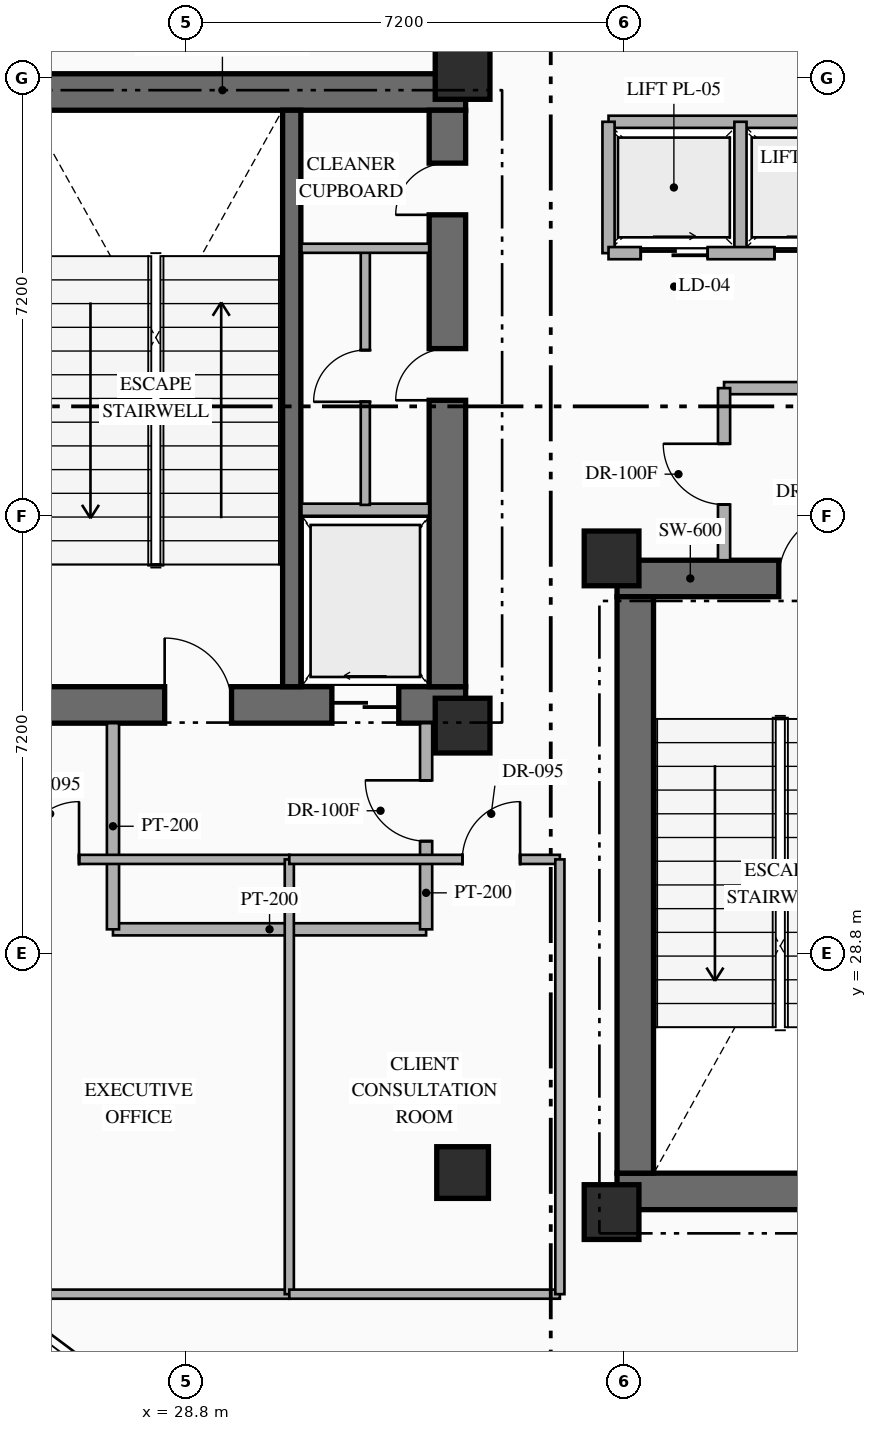
"""IFC4 building model, lengths in metres.
Left out: names, types, materials, properties, quantities, classifications, styles, units other than length and angle.
Written with IfcOpenShell. Run it as: python <this file> out.ifc"""

import sys

from ifc_helpers import new_model, si_unit, direction, frame, frame_2d, origin, origin_2d, place, context, subcontext, project, spatial, rectangle, hollow_rectangle, extrude, element, fill, save


model = new_model("IFC4")
c1 = context("Model", 3, precision=1e-05, world=origin(), true_north=direction((0.0, 1.0)))
c2 = subcontext(c1, "Body", "Model", "MODEL_VIEW")
j1 = project(units=[si_unit("LENGTHUNIT", "METRE"), si_unit("PLANEANGLEUNIT", "RADIAN")], contexts=[c1])
p1 = place(None, origin())
s1 = spatial("IfcSite", under=j1, at=p1, CompositionType="ELEMENT")
p2 = place(p1, origin())
s2 = spatial("IfcBuilding", under=s1, at=p2, CompositionType="ELEMENT")
p3 = place(p2, frame((0.0, 0.0, 130.05)))
s3 = spatial("IfcBuildingStorey", under=s2, at=p3, CompositionType="ELEMENT", Elevation=130.05)
p4 = place(p3, frame((25.62, 32.89, 0.0), z_axis=(0.0, 0.0, 1.0), x_axis=(1.0, 0.0, 0.0)))
e1 = element("IfcWall", 1, at=p4, inside=s3, PredefinedType="SHEAR", context=c2, shape_type="SweptSolid", body=[
    extrude(rectangle(XDim=7.78, YDim=0.6, at=frame_2d((3.89, 0.0))), origin(), (0.0, 0.0, 1.0), 4.8),
])
p5 = place(p4, frame((2.83, 0.0, 0.0)))
e2 = element("IfcOpeningElement", 2, at=p5, cuts=e1, PredefinedType="OPENING", context=c2, shape_type="SweptSolid", body=[
    extrude(rectangle(XDim=1.1, YDim=2.2, at=frame_2d((0.55, 1.1))), frame((0.0, 0.31, 0.0), z_axis=(0.0, -1.0, 0.0), x_axis=(1.0, 0.0, 0.0)), (0.0, 0.0, 1.0), 0.62),
])
p6 = place(p4, frame((5.58, 0.0, 0.0)))
e3 = element("IfcOpeningElement", 3, at=p6, cuts=e1, PredefinedType="OPENING", context=c2, shape_type="SweptSolid", body=[
    extrude(rectangle(XDim=1.1, YDim=2.15, at=frame_2d((0.55, 1.075))), frame((0.0, 0.31, 0.0), z_axis=(0.0, -1.0, 0.0), x_axis=(1.0, 0.0, 0.0)), (0.0, 0.0, 1.0), 0.62),
])
p7 = place(p3, frame((25.62, 42.97, 0.0), z_axis=(0.0, 0.0, 1.0), x_axis=(1.0, 0.0, 0.0)))
e4 = element("IfcWall", 4, at=p7, inside=s3, PredefinedType="SHEAR", context=c2, shape_type="SweptSolid", body=[
    extrude(rectangle(XDim=7.78, YDim=0.6, at=frame_2d((3.89, 0.0))), origin(), (0.0, 0.0, 1.0), 4.8),
])
p8 = place(p3, frame((33.1, 33.19, 0.0), z_axis=(0.0, 0.0, 1.0), x_axis=(0.0, 1.0, 0.0)))
e5 = element("IfcWall", 5, at=p8, inside=s3, PredefinedType="SHEAR", context=c2, shape_type="SweptSolid", body=[
    extrude(rectangle(XDim=9.48, YDim=0.6, at=frame_2d((4.74, 0.0))), origin(), (0.0, 0.0, 1.0), 4.8),
])
p9 = place(p8, frame((4.71, 0.0, 0.0)))
e6 = element("IfcOpeningElement", 6, at=p9, cuts=e5, PredefinedType="OPENING", context=c2, shape_type="SweptSolid", body=[
    extrude(rectangle(XDim=0.85, YDim=2.08, at=frame_2d((0.425, 1.04))), frame((0.0, 0.31, 0.0), z_axis=(0.0, -1.0, 0.0), x_axis=(1.0, 0.0, 0.0)), (0.0, 0.0, 1.0), 0.62),
])
p10 = place(p8, frame((7.76, 0.0, 0.0)))
e7 = element("IfcOpeningElement", 7, at=p10, cuts=e5, PredefinedType="OPENING", context=c2, shape_type="SweptSolid", body=[
    extrude(rectangle(XDim=0.85, YDim=2.08, at=frame_2d((0.425, 1.04))), frame((0.0, 0.31, 0.0), z_axis=(0.0, -1.0, 0.0), x_axis=(1.0, 0.0, 0.0)), (0.0, 0.0, 1.0), 0.62),
])
p11 = place(p3, frame((30.54, 33.19, 0.0), z_axis=(0.0, 0.0, 1.0), x_axis=(0.0, 1.0, 0.0)))
e8 = element("IfcWall", 8, at=p11, inside=s3, PredefinedType="SHEAR", context=c2, shape_type="SweptSolid", body=[
    extrude(rectangle(XDim=9.48, YDim=0.3, at=frame_2d((4.74, 0.0))), origin(), (0.0, 0.0, 1.0), 4.8),
])
p12 = place(p3, frame((35.89, 24.89, 0.0), z_axis=(0.0, 0.0, 1.0), x_axis=(1.0, 0.0, 0.0)))
e9 = element("IfcWall", 9, at=p12, inside=s3, PredefinedType="SHEAR", context=c2, shape_type="SweptSolid", body=[
    extrude(rectangle(XDim=7.76, YDim=0.6, at=frame_2d((3.88, 0.0))), origin(), (0.0, 0.0, 1.0), 4.8),
])
p13 = place(p3, frame((35.89, 34.97, 0.0), z_axis=(0.0, 0.0, 1.0), x_axis=(1.0, 0.0, 0.0)))
e10 = element("IfcWall", 10, at=p13, inside=s3, PredefinedType="SHEAR", context=c2, shape_type="SweptSolid", body=[
    extrude(rectangle(XDim=7.76, YDim=0.6, at=frame_2d((3.88, 0.0))), origin(), (0.0, 0.0, 1.0), 4.8),
])
p14 = place(p13, frame((2.66, 0.0, 0.0)))
e11 = element("IfcOpeningElement", 11, at=p14, cuts=e10, PredefinedType="OPENING", context=c2, shape_type="SweptSolid", body=[
    extrude(rectangle(XDim=1.1, YDim=2.2, at=frame_2d((0.55, 1.1))), frame((0.0, 0.31, 0.0), z_axis=(0.0, -1.0, 0.0), x_axis=(1.0, 0.0, 0.0)), (0.0, 0.0, 1.0), 0.62),
])
p15 = place(p13, frame((5.56, 0.0, 0.0)))
e12 = element("IfcOpeningElement", 12, at=p15, cuts=e10, PredefinedType="OPENING", context=c2, shape_type="SweptSolid", body=[
    extrude(rectangle(XDim=1.12, YDim=2.15, at=frame_2d((0.56, 1.075))), frame((0.0, 0.31, 0.0), z_axis=(0.0, -1.0, 0.0), x_axis=(1.0, 0.0, 0.0)), (0.0, 0.0, 1.0), 0.62),
])
p16 = place(p3, frame((36.19, 25.19, 0.0), z_axis=(0.0, 0.0, 1.0), x_axis=(0.0, 1.0, 0.0)))
e13 = element("IfcWall", 13, at=p16, inside=s3, PredefinedType="SHEAR", context=c2, shape_type="SweptSolid", body=[
    extrude(rectangle(XDim=9.48, YDim=0.6, at=frame_2d((4.74, 0.0))), origin(), (0.0, 0.0, 1.0), 4.8),
])
for number, where, z_axis, x_axis in (
    (14, (33.35, 32.55, 0.0), (0.0, 0.0, 1.0), (1.0, 0.0, 0.0)),
    (15, (33.35, 43.3, 0.0), (0.0, 0.0, 1.0), (1.0, 0.0, 0.0)),
    (16, (35.8, 24.55, 0.0), (0.0, 0.0, 1.0), (1.0, 0.0, 0.0)),
    (17, (35.8, 35.3, 0.0), (0.0, 0.0, 1.0), (1.0, 0.0, 0.0)),
):
    element("IfcColumn", number, at=place(p3, frame(where, z_axis=z_axis, x_axis=x_axis)), inside=s3, PredefinedType="COLUMN", context=c2, shape_type="SweptSolid", body=[
        extrude(rectangle(XDim=0.9, YDim=0.9, at=origin_2d()), origin(), (0.0, 0.0, 1.0), 4.8),
    ])
p17 = place(p3, frame((33.35, 25.2, 0.0), z_axis=(0.0, 0.0, 1.0), x_axis=(1.0, 0.0, 0.0)))
e18 = element("IfcColumn", 18, at=p17, inside=s3, PredefinedType="COLUMN", context=c2, shape_type="SweptSolid", body=[
    extrude(hollow_rectangle(XDim=0.85, YDim=0.85, WallThickness=0.032, at=origin_2d()), origin(), (0.0, 0.0, 1.0), 4.8),
])
p18 = place(p3, frame((30.7, 36.1, 0.0), z_axis=(0.0, 0.0, 1.0), x_axis=(1.0, 0.0, 0.0)))
e19 = element("IfcWall", 19, at=p18, inside=s3, PredefinedType="STANDARD", context=c2, shape_type="SweptSolid", body=[
    extrude(rectangle(XDim=2.1, YDim=0.2, at=frame_2d((1.05, 0.0))), origin(), (0.0, 0.0, 1.0), 4.55),
])
p19 = place(p3, frame((31.75, 36.18, 0.0), z_axis=(0.0, 0.0, 1.0), x_axis=(0.0, 1.0, 0.0)))
e20 = element("IfcWall", 20, at=p19, inside=s3, PredefinedType="PARTITIONING", context=c2, shape_type="SweptSolid", body=[
    extrude(rectangle(XDim=4.24, YDim=0.15, at=frame_2d((2.12, 0.0))), origin(), (0.0, 0.0, 1.0), 4.55),
])
p20 = place(p19, frame((1.695, 0.0, 0.0)))
e21 = element("IfcOpeningElement", 21, at=p20, cuts=e20, PredefinedType="OPENING", context=c2, shape_type="SweptSolid", body=[
    extrude(rectangle(XDim=0.85, YDim=2.08, at=frame_2d((0.425, 1.04))), frame((0.0, 0.085, 0.0), z_axis=(0.0, -1.0, 0.0), x_axis=(1.0, 0.0, 0.0)), (0.0, 0.0, 1.0), 0.17),
])
p21 = place(p3, frame((30.7, 40.4, 0.0), z_axis=(0.0, 0.0, 1.0), x_axis=(1.0, 0.0, 0.0)))
e22 = element("IfcWall", 22, at=p21, inside=s3, PredefinedType="PARTITIONING", context=c2, shape_type="SweptSolid", body=[
    extrude(rectangle(XDim=2.1, YDim=0.15, at=frame_2d((1.05, 0.0))), origin(), (0.0, 0.0, 1.0), 4.55),
])
p22 = place(p3, frame((27.6, 29.2, 0.0), z_axis=(0.0, 0.0, 1.0), x_axis=(1.0, 0.0, 0.0)))
e23 = element("IfcWall", 23, at=p22, inside=s3, PredefinedType="STANDARD", context=c2, shape_type="SweptSolid", body=[
    extrude(rectangle(XDim=5.15, YDim=0.2, at=frame_2d((2.575, 0.0))), origin(), (0.0, 0.0, 1.0), 4.55),
])
p23 = place(p3, frame((27.6, 29.2, 0.0), z_axis=(0.0, 0.0, 1.0), x_axis=(0.0, 1.0, 0.0)))
e24 = element("IfcWall", 24, at=p23, inside=s3, PredefinedType="STANDARD", context=c2, shape_type="SweptSolid", body=[
    extrude(rectangle(XDim=3.39, YDim=0.2, at=frame_2d((1.695, 0.0))), origin(), (0.0, 0.0, 1.0), 4.55),
])
p24 = place(p3, frame((32.75, 29.2, 0.0), z_axis=(0.0, 0.0, 1.0), x_axis=(0.0, 1.0, 0.0)))
e25 = element("IfcWall", 25, at=p24, inside=s3, PredefinedType="STANDARD", context=c2, shape_type="SweptSolid", body=[
    extrude(rectangle(XDim=3.39, YDim=0.2, at=frame_2d((1.695, 0.0))), origin(), (0.0, 0.0, 1.0), 4.55),
])
p25 = place(p24, frame((1.45, 0.0, 0.0)))
e26 = element("IfcOpeningElement", 26, at=p25, cuts=e25, PredefinedType="OPENING", context=c2, shape_type="SweptSolid", body=[
    extrude(rectangle(XDim=1.0, YDim=2.2, at=frame_2d((0.5, 1.1))), frame((0.0, 0.11, 0.0), z_axis=(0.0, -1.0, 0.0), x_axis=(1.0, 0.0, 0.0)), (0.0, 0.0, 1.0), 0.22),
])
p26 = place(p3, frame((37.65, 38.1, 0.0), z_axis=(0.0, 0.0, 1.0), x_axis=(1.0, 0.0, 0.0)))
e27 = element("IfcWall", 27, at=p26, inside=s3, PredefinedType="STANDARD", context=c2, shape_type="SweptSolid", body=[
    extrude(rectangle(XDim=5.3, YDim=0.2, at=frame_2d((2.65, 0.0))), origin(), (0.0, 0.0, 1.0), 4.55),
])
p27 = place(p3, frame((37.65, 35.27, 0.0), z_axis=(0.0, 0.0, 1.0), x_axis=(0.0, 1.0, 0.0)))
e28 = element("IfcWall", 28, at=p27, inside=s3, PredefinedType="STANDARD", context=c2, shape_type="SweptSolid", body=[
    extrude(rectangle(XDim=2.83, YDim=0.2, at=frame_2d((1.415, 0.0))), origin(), (0.0, 0.0, 1.0), 4.55),
])
p28 = place(p27, frame((0.915, 0.0, 0.0)))
e29 = element("IfcOpeningElement", 29, at=p28, cuts=e28, PredefinedType="OPENING", context=c2, shape_type="SweptSolid", body=[
    extrude(rectangle(XDim=1.0, YDim=2.2, at=frame_2d((0.5, 1.1))), frame((0.0, 0.11, 0.0), z_axis=(0.0, -1.0, 0.0), x_axis=(1.0, 0.0, 0.0)), (0.0, 0.0, 1.0), 0.22),
])
p29 = place(p3, frame((35.75, 42.48, 0.0), z_axis=(0.0, 0.0, 1.0), x_axis=(1.0, 0.0, 0.0)))
e30 = element("IfcWall", 30, at=p29, inside=s3, PredefinedType="STANDARD", context=c2, shape_type="SweptSolid", body=[
    extrude(rectangle(XDim=9.11, YDim=0.2, at=frame_2d((4.555, 0.0))), origin(), (0.0, 0.0, 1.0), 4.55),
])
for number, where, z_axis, x_axis in (
    (31, (35.75, 40.32, 0.0), (0.0, 0.0, 1.0), (0.0, 1.0, 0.0)),
    (32, (37.92, 40.32, 0.0), (0.0, 0.0, 1.0), (0.0, 1.0, 0.0)),
):
    element("IfcWall", number, at=place(p3, frame(where, z_axis=z_axis, x_axis=x_axis)), inside=s3, PredefinedType="STANDARD", context=c2, shape_type="SweptSolid", body=[
        extrude(rectangle(XDim=2.16, YDim=0.2, at=frame_2d((1.08, 0.0))), origin(), (0.0, 0.0, 1.0), 4.55),
    ])
p30 = place(p3, frame((35.75, 40.32, 0.0), z_axis=(0.0, 0.0, 1.0), x_axis=(1.0, 0.0, 0.0)))
e33 = element("IfcWall", 33, at=p30, inside=s3, PredefinedType="STANDARD", context=c2, shape_type="SweptSolid", body=[
    extrude(rectangle(XDim=9.11, YDim=0.2, at=frame_2d((4.555, 0.0))), origin(), (0.0, 0.0, 1.0), 4.55),
])
p31 = place(p30, frame((0.53, 0.0, 0.0)))
e34 = element("IfcOpeningElement", 34, at=p31, cuts=e33, PredefinedType="OPENING", context=c2, shape_type="SweptSolid", body=[
    extrude(rectangle(XDim=1.1, YDim=2.18, at=frame_2d((0.55, 1.09))), frame((0.0, 0.11, 0.0), z_axis=(0.0, -1.0, 0.0), x_axis=(1.0, 0.0, 0.0)), (0.0, 0.0, 1.0), 0.22),
])
p32 = place(p30, frame((2.73, 0.0, 0.0)))
e35 = element("IfcOpeningElement", 35, at=p32, cuts=e33, PredefinedType="OPENING", context=c2, shape_type="SweptSolid", body=[
    extrude(rectangle(XDim=1.1, YDim=2.18, at=frame_2d((0.55, 1.09))), frame((0.0, 0.11, 0.0), z_axis=(0.0, -1.0, 0.0), x_axis=(1.0, 0.0, 0.0)), (0.0, 0.0, 1.0), 0.22),
])
p33 = place(p30, frame((4.93, 0.0, 0.0)))
e36 = element("IfcOpeningElement", 36, at=p33, cuts=e33, PredefinedType="OPENING", context=c2, shape_type="SweptSolid", body=[
    extrude(rectangle(XDim=1.1, YDim=2.18, at=frame_2d((0.55, 1.09))), frame((0.0, 0.11, 0.0), z_axis=(0.0, -1.0, 0.0), x_axis=(1.0, 0.0, 0.0)), (0.0, 0.0, 1.0), 0.22),
])
p34 = place(p30, frame((7.13, 0.0, 0.0)))
e37 = element("IfcOpeningElement", 37, at=p34, cuts=e33, PredefinedType="OPENING", context=c2, shape_type="SweptSolid", body=[
    extrude(rectangle(XDim=1.1, YDim=2.18, at=frame_2d((0.55, 1.09))), frame((0.0, 0.11, 0.0), z_axis=(0.0, -1.0, 0.0), x_axis=(1.0, 0.0, 0.0)), (0.0, 0.0, 1.0), 0.22),
])
p35 = place(p3, frame((25.55, 23.2, 0.0), z_axis=(0.0, 0.0, 1.0), x_axis=(1.0, 0.0, 0.0)))
e38 = element("IfcWall", 38, at=p35, inside=s3, PredefinedType="PARTITIONING", context=c2, shape_type="SweptSolid", body=[
    extrude(rectangle(XDim=4.95, YDim=0.15, at=frame_2d((2.475, 0.0))), origin(), (0.0, 0.0, 1.0), 4.55),
])
p36 = place(p3, frame((25.55, 30.35, 0.0), z_axis=(0.0, 0.0, 1.0), x_axis=(1.0, 0.0, 0.0)))
e39 = element("IfcWall", 39, at=p36, inside=s3, PredefinedType="PARTITIONING", context=c2, shape_type="SweptSolid", body=[
    extrude(rectangle(XDim=4.95, YDim=0.15, at=frame_2d((2.475, 0.0))), origin(), (0.0, 0.0, 1.0), 4.55),
])
p37 = place(p36, frame((0.542, 0.0, 0.0)))
e40 = element("IfcOpeningElement", 40, at=p37, cuts=e39, PredefinedType="OPENING", context=c2, shape_type="SweptSolid", body=[
    extrude(rectangle(XDim=0.95, YDim=2.15, at=frame_2d((0.475, 1.075))), frame((0.0, 0.085, 0.0), z_axis=(0.0, -1.0, 0.0), x_axis=(1.0, 0.0, 0.0)), (0.0, 0.0, 1.0), 0.17),
])
p38 = place(p3, frame((30.5, 23.2, 0.0), z_axis=(0.0, 0.0, 1.0), x_axis=(0.0, 1.0, 0.0)))
e41 = element("IfcWall", 41, at=p38, inside=s3, PredefinedType="PARTITIONING", context=c2, shape_type="SweptSolid", body=[
    extrude(rectangle(XDim=7.15, YDim=0.15, at=frame_2d((3.575, 0.0))), origin(), (0.0, 0.0, 1.0), 4.55),
])
p39 = place(p3, frame((30.5, 23.2, 0.0), z_axis=(0.0, 0.0, 1.0), x_axis=(1.0, 0.0, 0.0)))
e42 = element("IfcWall", 42, at=p39, inside=s3, PredefinedType="PARTITIONING", context=c2, shape_type="SweptSolid", body=[
    extrude(rectangle(XDim=4.45, YDim=0.15, at=frame_2d((2.225, 0.0))), origin(), (0.0, 0.0, 1.0), 4.55),
])
p40 = place(p3, frame((30.5, 30.35, 0.0), z_axis=(0.0, 0.0, 1.0), x_axis=(1.0, 0.0, 0.0)))
e43 = element("IfcWall", 43, at=p40, inside=s3, PredefinedType="PARTITIONING", context=c2, shape_type="SweptSolid", body=[
    extrude(rectangle(XDim=4.45, YDim=0.15, at=frame_2d((2.225, 0.0))), origin(), (0.0, 0.0, 1.0), 4.55),
])
p41 = place(p40, frame((2.846, 0.0, 0.0)))
e44 = element("IfcOpeningElement", 44, at=p41, cuts=e43, PredefinedType="OPENING", context=c2, shape_type="SweptSolid", body=[
    extrude(rectangle(XDim=0.95, YDim=2.15, at=frame_2d((0.475, 1.075))), frame((0.0, 0.085, 0.0), z_axis=(0.0, -1.0, 0.0), x_axis=(1.0, 0.0, 0.0)), (0.0, 0.0, 1.0), 0.17),
])
p42 = place(p3, frame((34.95, 23.2, 0.0), z_axis=(0.0, 0.0, 1.0), x_axis=(0.0, 1.0, 0.0)))
e45 = element("IfcWall", 45, at=p42, inside=s3, PredefinedType="PARTITIONING", context=c2, shape_type="SweptSolid", body=[
    extrude(rectangle(XDim=7.15, YDim=0.15, at=frame_2d((3.575, 0.0))), origin(), (0.0, 0.0, 1.0), 4.55),
])
p43 = place(p3, frame((38.504, 13.472, 0.0), z_axis=(0.0, 0.0, 1.0), x_axis=(0.599993679268, 0.80000474051, 0.0)))
e46 = element("IfcWall", 46, at=p43, inside=s3, PredefinedType="PARTITIONING", context=c2, shape_type="SweptSolid", body=[
    extrude(rectangle(XDim=12.36, YDim=0.15, at=frame_2d((6.18, 0.0))), origin(), (0.0, 0.0, 1.0), 4.55),
])
p44 = place(p43, frame((5.705, 0.0, 0.0)))
e47 = element("IfcOpeningElement", 47, at=p44, cuts=e46, PredefinedType="OPENING", context=c2, shape_type="SweptSolid", body=[
    extrude(rectangle(XDim=0.95, YDim=2.15, at=frame_2d((0.475, 1.075))), frame((0.0, 0.085, 0.0), z_axis=(0.0, -1.0, 0.0), x_axis=(1.0, 0.0, 0.0)), (0.0, 0.0, 1.0), 0.17),
])
p45 = place(p5, origin())
e48 = element("IfcDoor", 48, at=p45, inside=s3, OperationType="SINGLE_SWING_LEFT", PredefinedType="DOOR", context=c2, shape_type="SweptSolid", body=[
    extrude(rectangle(XDim=1.1, YDim=2.2, at=frame_2d((0.55, 1.1))), frame((0.0, 0.025, 0.0), z_axis=(0.0, -1.0, 0.0), x_axis=(1.0, 0.0, 0.0)), (0.0, 0.0, 1.0), 0.05),
])
fill(e2, e48)
p46 = place(p6, origin())
e49 = element("IfcDoor", 49, at=p46, inside=s3, OperationType="SLIDING_TO_LEFT", PredefinedType="USERDEFINED", context=c2, shape_type="SweptSolid", body=[
    extrude(rectangle(XDim=1.1, YDim=2.15, at=frame_2d((0.55, 1.075))), frame((0.0, 0.025, 0.0), z_axis=(0.0, -1.0, 0.0), x_axis=(1.0, 0.0, 0.0)), (0.0, 0.0, 1.0), 0.05),
])
fill(e3, e49)
p47 = place(p14, origin())
e50 = element("IfcDoor", 50, at=p47, inside=s3, OperationType="SINGLE_SWING_RIGHT", PredefinedType="DOOR", context=c2, shape_type="SweptSolid", body=[
    extrude(rectangle(XDim=1.1, YDim=2.2, at=frame_2d((0.55, 1.1))), frame((0.0, 0.025, 0.0), z_axis=(0.0, -1.0, 0.0), x_axis=(1.0, 0.0, 0.0)), (0.0, 0.0, 1.0), 0.05),
])
fill(e11, e50)
p48 = place(p9, origin())
e51 = element("IfcDoor", 51, at=p48, inside=s3, OperationType="SINGLE_SWING_LEFT", PredefinedType="DOOR", context=c2, shape_type="SweptSolid", body=[
    extrude(rectangle(XDim=0.85, YDim=2.08, at=frame_2d((0.425, 1.04))), frame((0.0, 0.025, 0.0), z_axis=(0.0, -1.0, 0.0), x_axis=(1.0, 0.0, 0.0)), (0.0, 0.0, 1.0), 0.05),
])
fill(e6, e51)
p49 = place(p10, origin())
e52 = element("IfcDoor", 52, at=p49, inside=s3, OperationType="SINGLE_SWING_LEFT", PredefinedType="DOOR", context=c2, shape_type="SweptSolid", body=[
    extrude(rectangle(XDim=0.85, YDim=2.08, at=frame_2d((0.425, 1.04))), frame((0.0, 0.025, 0.0), z_axis=(0.0, -1.0, 0.0), x_axis=(1.0, 0.0, 0.0)), (0.0, 0.0, 1.0), 0.05),
])
fill(e7, e52)
p50 = place(p20, origin())
e53 = element("IfcDoor", 53, at=p50, inside=s3, OperationType="SINGLE_SWING_LEFT", PredefinedType="DOOR", context=c2, shape_type="SweptSolid", body=[
    extrude(rectangle(XDim=0.85, YDim=2.08, at=frame_2d((0.425, 1.04))), frame((0.0, 0.025, 0.0), z_axis=(0.0, -1.0, 0.0), x_axis=(1.0, 0.0, 0.0)), (0.0, 0.0, 1.0), 0.05),
])
fill(e21, e53)
p51 = place(p25, origin())
e54 = element("IfcDoor", 54, at=p51, inside=s3, OperationType="SINGLE_SWING_RIGHT", PredefinedType="DOOR", context=c2, shape_type="SweptSolid", body=[
    extrude(rectangle(XDim=1.0, YDim=2.2, at=frame_2d((0.5, 1.1))), frame((0.0, 0.025, 0.0), z_axis=(0.0, -1.0, 0.0), x_axis=(1.0, 0.0, 0.0)), (0.0, 0.0, 1.0), 0.05),
])
fill(e26, e54)
p52 = place(p28, origin())
e55 = element("IfcDoor", 55, at=p52, inside=s3, OperationType="SINGLE_SWING_RIGHT", PredefinedType="DOOR", context=c2, shape_type="SweptSolid", body=[
    extrude(rectangle(XDim=1.0, YDim=2.2, at=frame_2d((0.5, 1.1))), frame((0.0, 0.025, 0.0), z_axis=(0.0, -1.0, 0.0), x_axis=(1.0, 0.0, 0.0)), (0.0, 0.0, 1.0), 0.05),
])
fill(e29, e55)
p53 = place(p31, origin())
e56 = element("IfcDoor", 56, at=p53, inside=s3, OperationType="SLIDING_TO_RIGHT", PredefinedType="USERDEFINED", context=c2, shape_type="SweptSolid", body=[
    extrude(rectangle(XDim=1.1, YDim=2.18, at=frame_2d((0.55, 1.09))), frame((0.0, 0.025, 0.0), z_axis=(0.0, -1.0, 0.0), x_axis=(1.0, 0.0, 0.0)), (0.0, 0.0, 1.0), 0.05),
])
fill(e34, e56)
p54 = place(p32, origin())
e57 = element("IfcDoor", 57, at=p54, inside=s3, OperationType="SLIDING_TO_RIGHT", PredefinedType="USERDEFINED", context=c2, shape_type="SweptSolid", body=[
    extrude(rectangle(XDim=1.1, YDim=2.18, at=frame_2d((0.55, 1.09))), frame((0.0, 0.025, 0.0), z_axis=(0.0, -1.0, 0.0), x_axis=(1.0, 0.0, 0.0)), (0.0, 0.0, 1.0), 0.05),
])
fill(e35, e57)
p55 = place(p37, origin())
e58 = element("IfcDoor", 58, at=p55, inside=s3, OperationType="SINGLE_SWING_RIGHT", PredefinedType="DOOR", context=c2, shape_type="SweptSolid", body=[
    extrude(rectangle(XDim=0.95, YDim=2.15, at=frame_2d((0.475, 1.075))), frame((0.0, 0.025, 0.0), z_axis=(0.0, -1.0, 0.0), x_axis=(1.0, 0.0, 0.0)), (0.0, 0.0, 1.0), 0.05),
])
fill(e40, e58)
p56 = place(p41, origin())
e59 = element("IfcDoor", 59, at=p56, inside=s3, OperationType="SINGLE_SWING_RIGHT", PredefinedType="DOOR", context=c2, shape_type="SweptSolid", body=[
    extrude(rectangle(XDim=0.95, YDim=2.15, at=frame_2d((0.475, 1.075))), frame((0.0, 0.025, 0.0), z_axis=(0.0, -1.0, 0.0), x_axis=(1.0, 0.0, 0.0)), (0.0, 0.0, 1.0), 0.05),
])
fill(e44, e59)
save(model, sys.argv[1])
